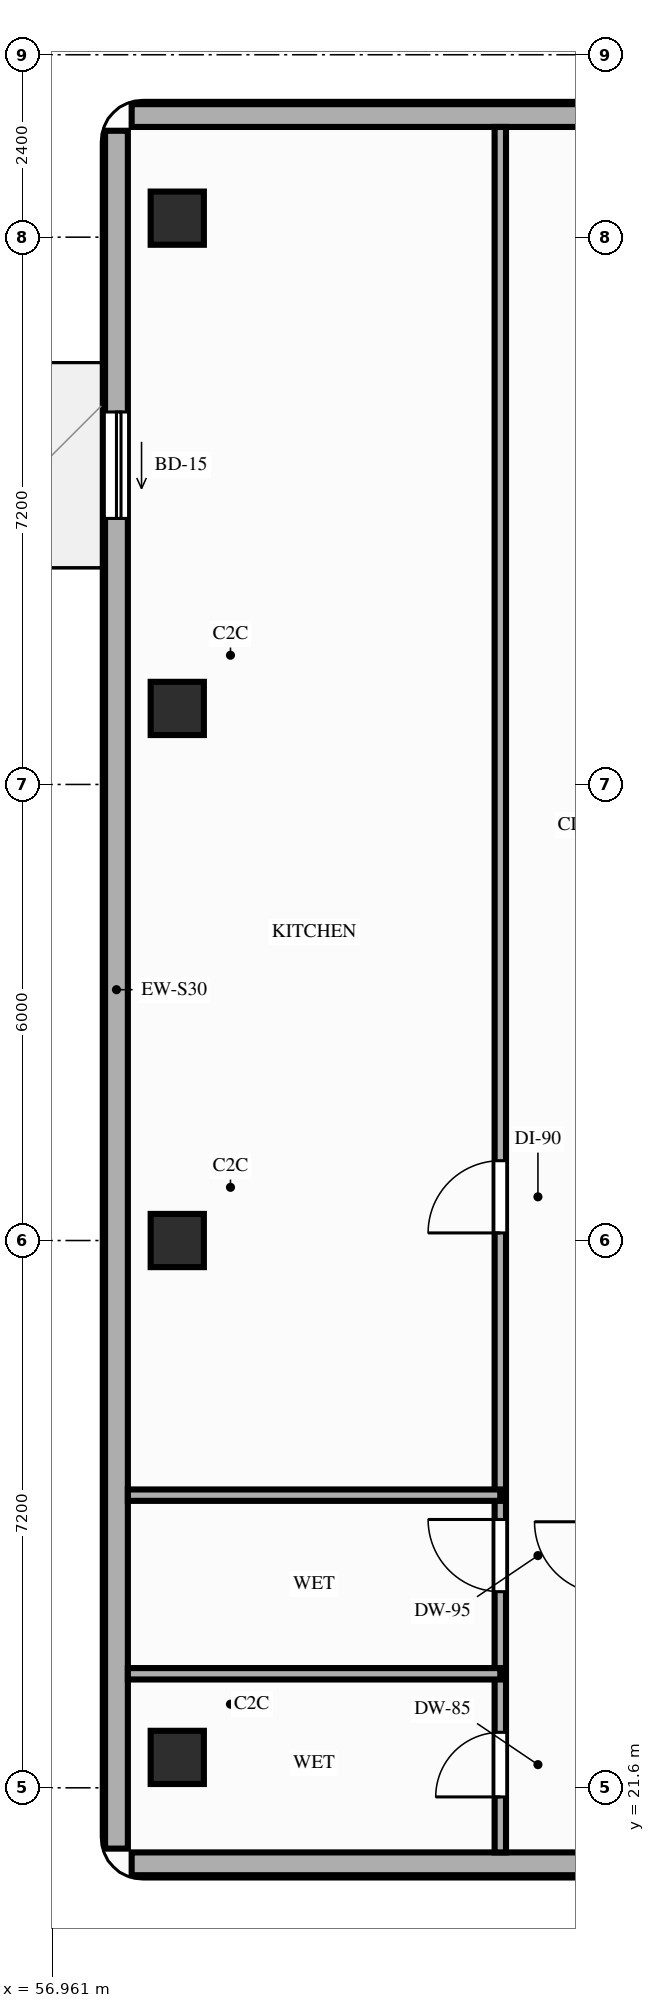
"""IFC4 building model, lengths in metres.
Left out: names, types, materials, properties, quantities, classifications, styles, units other than length and angle.
Written with IfcOpenShell. Run it as: python <this file> out.ifc"""

import sys

from ifc_helpers import new_model, si_unit, direction, frame, frame_2d, origin, origin_2d, place, context, subcontext, project, spatial, rectangle, extrude, element, fill, save


model = new_model("IFC4")
c1 = context("Model", 3, precision=1e-05, world=origin(), true_north=direction((0.0, 1.0)))
c2 = subcontext(c1, "Body", "Model", "MODEL_VIEW")
j1 = project(units=[si_unit("LENGTHUNIT", "METRE"), si_unit("PLANEANGLEUNIT", "RADIAN")], contexts=[c1])
p1 = place(None, origin())
s1 = spatial("IfcSite", under=j1, at=p1, CompositionType="ELEMENT")
p2 = place(p1, origin())
s2 = spatial("IfcBuilding", under=s1, at=p2, CompositionType="ELEMENT")
p3 = place(p2, frame((0.0, 0.0, 99.4)))
s3 = spatial("IfcBuildingStorey", under=s2, at=p3, CompositionType="ELEMENT", Elevation=99.4)
for number, where, z_axis, x_axis in (
    (1, (58.6, 22.0, 0.0), (0.0, 0.0, 1.0), (1.0, 0.0, 0.0)),
    (2, (58.6, 28.8, 0.0), (0.0, 0.0, 1.0), (1.0, 0.0, 0.0)),
    (3, (58.6, 35.8, 0.0), (0.0, 0.0, 1.0), (1.0, 0.0, 0.0)),
    (4, (58.6, 42.25, 0.0), (0.0, 0.0, 1.0), (1.0, 0.0, 0.0)),
):
    element("IfcColumn", number, at=place(p3, frame(where, z_axis=z_axis, x_axis=x_axis)), inside=s3, PredefinedType="COLUMN", context=c2, shape_type="SweptSolid", body=[
        extrude(rectangle(XDim=0.7, YDim=0.7, at=origin_2d()), origin(), (0.0, 0.0, 1.0), 3.2),
    ])
p4 = place(p3, frame((57.8, 43.4, 0.0), z_axis=(0.0, 0.0, 1.0), x_axis=(0.0, -1.0, 0.0)))
e5 = element("IfcWall", 5, at=p4, inside=s3, PredefinedType="STANDARD", context=c2, shape_type="SweptSolid", body=[
    extrude(rectangle(XDim=22.6, YDim=0.3, at=frame_2d((11.3, 0.0))), origin(), (0.0, 0.0, 1.0), 2.35),
])
p5 = place(p4, frame((3.7, 0.0, 0.0)))
e6 = element("IfcOpeningElement", 6, at=p5, cuts=e5, PredefinedType="OPENING", context=c2, shape_type="SweptSolid", body=[
    extrude(rectangle(XDim=1.4, YDim=2.1, at=frame_2d((0.7, 1.05))), frame((0.0, 0.16, 0.0), z_axis=(0.0, -1.0, 0.0), x_axis=(1.0, 0.0, 0.0)), (0.0, 0.0, 1.0), 0.32),
])
for number, where, z_axis, x_axis in (
    (7, (72.8, 43.6, 0.0), (0.0, 0.0, 1.0), (-1.0, 0.0, 0.0)),
    (8, (58.0, 20.6, 0.0), (0.0, 0.0, 1.0), (1.0, 0.0, 0.0)),
):
    element("IfcWall", number, at=place(p3, frame(where, z_axis=z_axis, x_axis=x_axis)), inside=s3, PredefinedType="STANDARD", context=c2, shape_type="SweptSolid", body=[
        extrude(rectangle(XDim=14.8, YDim=0.3, at=frame_2d((7.4, 0.0))), origin(), (0.0, 0.0, 1.0), 2.96),
    ])
p6 = place(p3, frame((62.85, 20.75, 0.0), z_axis=(0.0, 0.0, 1.0), x_axis=(0.0, 1.0, 0.0)))
e9 = element("IfcWall", 9, at=p6, inside=s3, PredefinedType="PARTITIONING", context=c2, shape_type="SweptSolid", body=[
    extrude(rectangle(XDim=22.7, YDim=0.15, at=frame_2d((11.35, 0.0))), origin(), (0.0, 0.0, 1.0), 2.54),
])
p7 = place(p6, frame((0.73, 0.0, 0.0)))
e10 = element("IfcOpeningElement", 10, at=p7, cuts=e9, PredefinedType="OPENING", context=c2, shape_type="SweptSolid", body=[
    extrude(rectangle(XDim=0.85, YDim=2.1, at=frame_2d((0.425, 1.05))), frame((0.0, 0.085, 0.0), z_axis=(0.0, -1.0, 0.0), x_axis=(1.0, 0.0, 0.0)), (0.0, 0.0, 1.0), 0.17),
])
p8 = place(p6, frame((3.43, 0.0, 0.0)))
e11 = element("IfcOpeningElement", 11, at=p8, cuts=e9, PredefinedType="OPENING", context=c2, shape_type="SweptSolid", body=[
    extrude(rectangle(XDim=0.95, YDim=2.1, at=frame_2d((0.475, 1.05))), frame((0.0, 0.085, 0.0), z_axis=(0.0, -1.0, 0.0), x_axis=(1.0, 0.0, 0.0)), (0.0, 0.0, 1.0), 0.17),
])
p9 = place(p6, frame((8.15, 0.0, 0.0)))
e12 = element("IfcOpeningElement", 12, at=p9, cuts=e9, PredefinedType="OPENING", context=c2, shape_type="SweptSolid", body=[
    extrude(rectangle(XDim=0.95, YDim=2.15, at=frame_2d((0.475, 1.075))), frame((0.0, 0.085, 0.0), z_axis=(0.0, -1.0, 0.0), x_axis=(1.0, 0.0, 0.0)), (0.0, 0.0, 1.0), 0.17),
])
for number, where, z_axis, x_axis in (
    (13, (57.95, 23.1, 0.0), (0.0, 0.0, 1.0), (1.0, 0.0, 0.0)),
    (14, (57.95, 25.45, 0.0), (0.0, 0.0, 1.0), (1.0, 0.0, 0.0)),
):
    element("IfcWall", number, at=place(p3, frame(where, z_axis=z_axis, x_axis=x_axis)), inside=s3, PredefinedType="PARTITIONING", context=c2, shape_type="SweptSolid", body=[
        extrude(rectangle(XDim=4.9, YDim=0.15, at=frame_2d((2.45, 0.0))), origin(), (0.0, 0.0, 1.0), 2.54),
    ])
p10 = place(p5, origin())
e15 = element("IfcDoor", 15, at=p10, inside=s3, OperationType="SLIDING_TO_RIGHT", PredefinedType="DOOR", context=c2, shape_type="SweptSolid", body=[
    extrude(rectangle(XDim=1.4, YDim=2.1, at=frame_2d((0.7, 1.05))), frame((0.0, 0.025, 0.0), z_axis=(0.0, -1.0, 0.0), x_axis=(1.0, 0.0, 0.0)), (0.0, 0.0, 1.0), 0.05),
])
fill(e6, e15)
p11 = place(p7, origin())
e16 = element("IfcDoor", 16, at=p11, inside=s3, OperationType="SINGLE_SWING_LEFT", PredefinedType="DOOR", context=c2, shape_type="SweptSolid", body=[
    extrude(rectangle(XDim=0.85, YDim=2.1, at=frame_2d((0.425, 1.05))), frame((0.0, 0.025, 0.0), z_axis=(0.0, -1.0, 0.0), x_axis=(1.0, 0.0, 0.0)), (0.0, 0.0, 1.0), 0.05),
])
fill(e10, e16)
p12 = place(p8, origin())
e17 = element("IfcDoor", 17, at=p12, inside=s3, OperationType="SINGLE_SWING_RIGHT", PredefinedType="DOOR", context=c2, shape_type="SweptSolid", body=[
    extrude(rectangle(XDim=0.95, YDim=2.1, at=frame_2d((0.475, 1.05))), frame((0.0, 0.025, 0.0), z_axis=(0.0, -1.0, 0.0), x_axis=(1.0, 0.0, 0.0)), (0.0, 0.0, 1.0), 0.05),
])
fill(e11, e17)
p13 = place(p9, origin())
e18 = element("IfcDoor", 18, at=p13, inside=s3, OperationType="SINGLE_SWING_LEFT", PredefinedType="DOOR", context=c2, shape_type="SweptSolid", body=[
    extrude(rectangle(XDim=0.95, YDim=2.15, at=frame_2d((0.475, 1.075))), frame((0.0, 0.025, 0.0), z_axis=(0.0, -1.0, 0.0), x_axis=(1.0, 0.0, 0.0)), (0.0, 0.0, 1.0), 0.05),
])
fill(e12, e18)
save(model, sys.argv[1])
